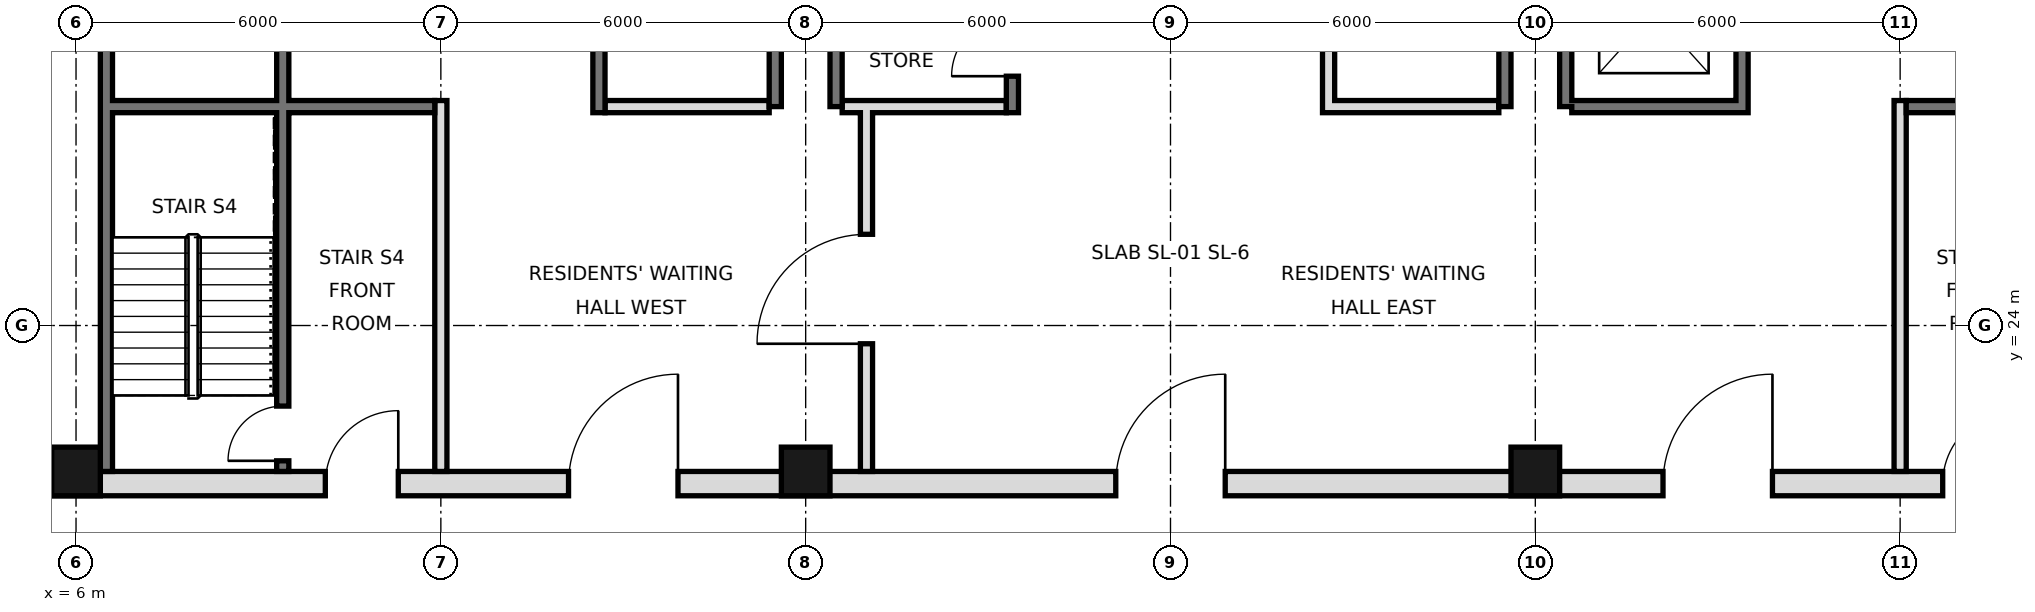
"""IFC4 building model, lengths in metres.
Left out: names, types, materials, properties, quantities, classifications, styles, units other than length and angle.
Written with IfcOpenShell. Run it as: python <this file> out.ifc"""

import sys

from ifc_helpers import new_model, si_unit, direction, frame, frame_2d, origin, origin_2d, place, context, subcontext, project, spatial, rectangle, hollow_rectangle, extrude, element, fill, save


model = new_model("IFC4")
c1 = context("Model", 3, precision=1e-05, world=origin(), true_north=direction((0.0, 1.0)))
c2 = subcontext(c1, "Body", "Model", "MODEL_VIEW")
j1 = project(units=[si_unit("LENGTHUNIT", "METRE"), si_unit("PLANEANGLEUNIT", "RADIAN")], contexts=[c1])
p1 = place(None, origin())
s1 = spatial("IfcSite", under=j1, at=p1, CompositionType="ELEMENT")
p2 = place(p1, origin())
s2 = spatial("IfcBuilding", under=s1, at=p2, CompositionType="ELEMENT")
p3 = place(p2, frame((0.0, 0.0, 290.8)))
s3 = spatial("IfcBuildingStorey", under=s2, at=p3, CompositionType="ELEMENT", Elevation=290.8)
for number, where, z_axis, x_axis in (
    (1, (6.0, 21.6, 0.0), (0.0, 0.0, 1.0), (1.0, 0.0, 0.0)),
    (2, (18.0, 21.6, 0.0), (0.0, 0.0, 1.0), (1.0, 0.0, 0.0)),
    (3, (30.0, 21.6, 0.0), (0.0, 0.0, 1.0), (1.0, 0.0, 0.0)),
):
    element("IfcColumn", number, at=place(p3, frame(where, z_axis=z_axis, x_axis=x_axis)), inside=s3, PredefinedType="COLUMN", context=c2, shape_type="SweptSolid", body=[
        extrude(hollow_rectangle(XDim=0.8, YDim=0.8, WallThickness=0.032, at=origin_2d()), origin(), (0.0, 0.0, 1.0), 3.6),
    ])
p4 = place(p3, frame((6.5, 21.6, 0.0), z_axis=(0.0, 0.0, 1.0), x_axis=(0.0, 1.0, 0.0)))
e4 = element("IfcWall", 4, at=p4, inside=s3, PredefinedType="SOLIDWALL", context=c2, shape_type="SweptSolid", body=[
    extrude(rectangle(XDim=23.5, YDim=0.2, at=frame_2d((11.75, 0.0))), origin(), (0.0, 0.0, 1.0), 3.42),
])
for number, where, z_axis, x_axis in (
    (5, (17.5, 27.6, 0.0), (0.0, 0.0, 1.0), (0.0, 1.0, 0.0)),
    (6, (18.5, 27.6, 0.0), (0.0, 0.0, 1.0), (0.0, 1.0, 0.0)),
    (7, (29.5, 27.6, 0.0), (0.0, 0.0, 1.0), (0.0, 1.0, 0.0)),
    (8, (30.5, 27.6, 0.0), (0.0, 0.0, 1.0), (0.0, 1.0, 0.0)),
):
    element("IfcWall", number, at=place(p3, frame(where, z_axis=z_axis, x_axis=x_axis)), inside=s3, PredefinedType="SOLIDWALL", context=c2, shape_type="SweptSolid", body=[
        extrude(rectangle(XDim=17.5, YDim=0.2, at=frame_2d((8.75, 0.0))), origin(), (0.0, 0.0, 1.0), 3.42),
    ])
p5 = place(p3, frame((5.6, 21.4, 0.0), z_axis=(0.0, 0.0, 1.0), x_axis=(1.0, 0.0, 0.0)))
e9 = element("IfcWall", 9, at=p5, inside=s3, PredefinedType="SOLIDWALL", context=c2, shape_type="SweptSolid", body=[
    extrude(rectangle(XDim=36.8, YDim=0.4, at=frame_2d((18.4, 0.0))), origin(), (0.0, 0.0, 1.0), 3.42),
])
p6 = place(p5, frame((8.5, 0.0, 0.0)))
e10 = element("IfcOpeningElement", 10, at=p6, cuts=e9, PredefinedType="OPENING", context=c2, shape_type="SweptSolid", body=[
    extrude(rectangle(XDim=1.8, YDim=2.1, at=frame_2d((0.9, 1.05))), frame((0.0, 0.21, 0.0), z_axis=(0.0, -1.0, 0.0), x_axis=(1.0, 0.0, 0.0)), (0.0, 0.0, 1.0), 0.42),
])
p7 = place(p5, frame((17.5, 0.0, 0.0)))
e11 = element("IfcOpeningElement", 11, at=p7, cuts=e9, PredefinedType="OPENING", context=c2, shape_type="SweptSolid", body=[
    extrude(rectangle(XDim=1.8, YDim=2.1, at=frame_2d((0.9, 1.05))), frame((0.0, 0.21, 0.0), z_axis=(0.0, -1.0, 0.0), x_axis=(1.0, 0.0, 0.0)), (0.0, 0.0, 1.0), 0.42),
])
p8 = place(p5, frame((26.5, 0.0, 0.0)))
e12 = element("IfcOpeningElement", 12, at=p8, cuts=e9, PredefinedType="OPENING", context=c2, shape_type="SweptSolid", body=[
    extrude(rectangle(XDim=1.8, YDim=2.1, at=frame_2d((0.9, 1.05))), frame((0.0, 0.21, 0.0), z_axis=(0.0, -1.0, 0.0), x_axis=(1.0, 0.0, 0.0)), (0.0, 0.0, 1.0), 0.42),
])
p9 = place(p5, frame((4.5, 0.0, 0.0)))
e13 = element("IfcOpeningElement", 13, at=p9, cuts=e9, PredefinedType="OPENING", context=c2, shape_type="SweptSolid", body=[
    extrude(rectangle(XDim=1.2, YDim=2.1, at=frame_2d((0.6, 1.05))), frame((0.0, 0.21, 0.0), z_axis=(0.0, -1.0, 0.0), x_axis=(1.0, 0.0, 0.0)), (0.0, 0.0, 1.0), 0.42),
])
p10 = place(p5, frame((31.1, 0.0, 0.0)))
e14 = element("IfcOpeningElement", 14, at=p10, cuts=e9, PredefinedType="OPENING", context=c2, shape_type="SweptSolid", body=[
    extrude(rectangle(XDim=1.2, YDim=2.1, at=frame_2d((0.6, 1.05))), frame((0.0, 0.21, 0.0), z_axis=(0.0, -1.0, 0.0), x_axis=(1.0, 0.0, 0.0)), (0.0, 0.0, 1.0), 0.42),
])
p11 = place(p3, frame((19.0, 21.6, 0.0), z_axis=(0.0, 0.0, 1.0), x_axis=(0.0, 1.0, 0.0)))
e15 = element("IfcWall", 15, at=p11, inside=s3, PredefinedType="PARTITIONING", context=c2, shape_type="SweptSolid", body=[
    extrude(rectangle(XDim=6.0, YDim=0.2, at=frame_2d((3.0, 0.0))), origin(), (0.0, 0.0, 1.0), 3.42),
])
p12 = place(p11, frame((2.1, 0.0, 0.0)))
e16 = element("IfcOpeningElement", 16, at=p12, cuts=e15, PredefinedType="OPENING", context=c2, shape_type="SweptSolid", body=[
    extrude(rectangle(XDim=1.8, YDim=2.1, at=frame_2d((0.9, 1.05))), frame((0.0, 0.11, 0.0), z_axis=(0.0, -1.0, 0.0), x_axis=(1.0, 0.0, 0.0)), (0.0, 0.0, 1.0), 0.22),
])
p13 = place(p3, frame((12.0, 21.6, 0.0), z_axis=(0.0, 0.0, 1.0), x_axis=(0.0, 1.0, 0.0)))
e17 = element("IfcWall", 17, at=p13, inside=s3, PredefinedType="PARTITIONING", context=c2, shape_type="SweptSolid", body=[
    extrude(rectangle(XDim=6.1, YDim=0.2, at=frame_2d((3.05, 0.0))), origin(), (0.0, 0.0, 1.0), 3.42),
])
p14 = place(p3, frame((14.6, 27.5, 0.0), z_axis=(0.0, 0.0, 1.0), x_axis=(0.0, 1.0, 0.0)))
e18 = element("IfcWall", 18, at=p14, inside=s3, PredefinedType="SOLIDWALL", context=c2, shape_type="SweptSolid", body=[
    extrude(rectangle(XDim=17.5, YDim=0.2, at=frame_2d((8.75, 0.0))), origin(), (0.0, 0.0, 1.0), 3.42),
])
p15 = place(p14, frame((15.4, 0.0, 0.0)))
e19 = element("IfcOpeningElement", 19, at=p15, cuts=e18, PredefinedType="OPENING", context=c2, shape_type="SweptSolid", body=[
    extrude(rectangle(XDim=1.1, YDim=2.1, at=frame_2d((0.55, 1.05))), frame((0.0, 0.11, 0.0), z_axis=(0.0, -1.0, 0.0), x_axis=(1.0, 0.0, 0.0)), (0.0, 0.0, 1.0), 0.22),
])
p16 = place(p14, frame((2.7, 0.0, 0.0)))
e20 = element("IfcOpeningElement", 20, at=p16, cuts=e18, PredefinedType="OPENING", context=c2, shape_type="SweptSolid", body=[
    extrude(rectangle(XDim=1.0, YDim=2.1, at=frame_2d((0.5, 1.05))), frame((0.0, 0.11, 0.0), z_axis=(0.0, -1.0, 0.0), x_axis=(1.0, 0.0, 0.0)), (0.0, 0.0, 1.0), 0.22),
])
p17 = place(p14, frame((9.9, 0.0, 0.0)))
e21 = element("IfcOpeningElement", 21, at=p17, cuts=e18, PredefinedType="OPENING", context=c2, shape_type="SweptSolid", body=[
    extrude(rectangle(XDim=0.9, YDim=2.1, at=frame_2d((0.45, 1.05))), frame((0.0, 0.11, 0.0), z_axis=(0.0, -1.0, 0.0), x_axis=(1.0, 0.0, 0.0)), (0.0, 0.0, 1.0), 0.22),
])
p18 = place(p3, frame((21.4, 27.5, 0.0), z_axis=(0.0, 0.0, 1.0), x_axis=(0.0, 1.0, 0.0)))
e22 = element("IfcWall", 22, at=p18, inside=s3, PredefinedType="SOLIDWALL", context=c2, shape_type="SweptSolid", body=[
    extrude(rectangle(XDim=17.5, YDim=0.2, at=frame_2d((8.75, 0.0))), origin(), (0.0, 0.0, 1.0), 3.42),
])
p19 = place(p18, frame((0.6, 0.0, 0.0)))
e23 = element("IfcOpeningElement", 23, at=p19, cuts=e22, PredefinedType="OPENING", context=c2, shape_type="SweptSolid", body=[
    extrude(rectangle(XDim=1.0, YDim=2.1, at=frame_2d((0.5, 1.05))), frame((0.0, 0.11, 0.0), z_axis=(0.0, -1.0, 0.0), x_axis=(1.0, 0.0, 0.0)), (0.0, 0.0, 1.0), 0.22),
])
p20 = place(p18, frame((3.7, 0.0, 0.0)))
e24 = element("IfcOpeningElement", 24, at=p20, cuts=e22, PredefinedType="OPENING", context=c2, shape_type="SweptSolid", body=[
    extrude(rectangle(XDim=1.0, YDim=2.1, at=frame_2d((0.5, 1.05))), frame((0.0, 0.11, 0.0), z_axis=(0.0, -1.0, 0.0), x_axis=(1.0, 0.0, 0.0)), (0.0, 0.0, 1.0), 0.22),
])
p21 = place(p18, frame((16.2, 0.0, 0.0)))
e25 = element("IfcOpeningElement", 25, at=p21, cuts=e22, PredefinedType="OPENING", context=c2, shape_type="SweptSolid", body=[
    extrude(rectangle(XDim=1.0, YDim=2.1, at=frame_2d((0.5, 1.05))), frame((0.0, 0.11, 0.0), z_axis=(0.0, -1.0, 0.0), x_axis=(1.0, 0.0, 0.0)), (0.0, 0.0, 1.0), 0.22),
])
p22 = place(p18, frame((7.4, 0.0, 0.0)))
e26 = element("IfcOpeningElement", 26, at=p22, cuts=e22, PredefinedType="OPENING", context=c2, shape_type="SweptSolid", body=[
    extrude(rectangle(XDim=0.9, YDim=2.1, at=frame_2d((0.45, 1.05))), frame((0.0, 0.11, 0.0), z_axis=(0.0, -1.0, 0.0), x_axis=(1.0, 0.0, 0.0)), (0.0, 0.0, 1.0), 0.22),
])
p23 = place(p3, frame((26.6, 27.5, 0.0), z_axis=(0.0, 0.0, 1.0), x_axis=(0.0, 1.0, 0.0)))
e27 = element("IfcWall", 27, at=p23, inside=s3, PredefinedType="SOLIDWALL", context=c2, shape_type="SweptSolid", body=[
    extrude(rectangle(XDim=17.5, YDim=0.2, at=frame_2d((8.75, 0.0))), origin(), (0.0, 0.0, 1.0), 3.42),
])
p24 = place(p23, frame((4.3, 0.0, 0.0)))
e28 = element("IfcOpeningElement", 28, at=p24, cuts=e27, PredefinedType="OPENING", context=c2, shape_type="SweptSolid", body=[
    extrude(rectangle(XDim=0.9, YDim=2.1, at=frame_2d((0.45, 1.05))), frame((0.0, 0.11, 0.0), z_axis=(0.0, -1.0, 0.0), x_axis=(1.0, 0.0, 0.0)), (0.0, 0.0, 1.0), 0.22),
])
p25 = place(p23, frame((10.35, 0.0, 0.0)))
e29 = element("IfcOpeningElement", 29, at=p25, cuts=e27, PredefinedType="OPENING", context=c2, shape_type="SweptSolid", body=[
    extrude(rectangle(XDim=1.0, YDim=2.1, at=frame_2d((0.5, 1.05))), frame((0.0, 0.11, 0.0), z_axis=(0.0, -1.0, 0.0), x_axis=(1.0, 0.0, 0.0)), (0.0, 0.0, 1.0), 0.22),
])
p26 = place(p3, frame((33.4, 27.5, 0.0), z_axis=(0.0, 0.0, 1.0), x_axis=(0.0, 1.0, 0.0)))
e30 = element("IfcWall", 30, at=p26, inside=s3, PredefinedType="SOLIDWALL", context=c2, shape_type="SweptSolid", body=[
    extrude(rectangle(XDim=17.5, YDim=0.2, at=frame_2d((8.75, 0.0))), origin(), (0.0, 0.0, 1.0), 3.42),
])
p27 = place(p26, frame((1.1, 0.0, 0.0)))
e31 = element("IfcOpeningElement", 31, at=p27, cuts=e30, PredefinedType="OPENING", context=c2, shape_type="SweptSolid", body=[
    extrude(rectangle(XDim=1.1, YDim=2.1, at=frame_2d((0.55, 1.05))), frame((0.0, 0.11, 0.0), z_axis=(0.0, -1.0, 0.0), x_axis=(1.0, 0.0, 0.0)), (0.0, 0.0, 1.0), 0.22),
])
p28 = place(p26, frame((4.2, 0.0, 0.0)))
e32 = element("IfcOpeningElement", 32, at=p28, cuts=e30, PredefinedType="OPENING", context=c2, shape_type="SweptSolid", body=[
    extrude(rectangle(XDim=1.1, YDim=2.1, at=frame_2d((0.55, 1.05))), frame((0.0, 0.11, 0.0), z_axis=(0.0, -1.0, 0.0), x_axis=(1.0, 0.0, 0.0)), (0.0, 0.0, 1.0), 0.22),
])
p29 = place(p26, frame((15.4, 0.0, 0.0)))
e33 = element("IfcOpeningElement", 33, at=p29, cuts=e30, PredefinedType="OPENING", context=c2, shape_type="SweptSolid", body=[
    extrude(rectangle(XDim=1.1, YDim=2.1, at=frame_2d((0.55, 1.05))), frame((0.0, 0.11, 0.0), z_axis=(0.0, -1.0, 0.0), x_axis=(1.0, 0.0, 0.0)), (0.0, 0.0, 1.0), 0.22),
])
p30 = place(p26, frame((9.9, 0.0, 0.0)))
e34 = element("IfcOpeningElement", 34, at=p30, cuts=e30, PredefinedType="OPENING", context=c2, shape_type="SweptSolid", body=[
    extrude(rectangle(XDim=0.9, YDim=2.1, at=frame_2d((0.45, 1.05))), frame((0.0, 0.11, 0.0), z_axis=(0.0, -1.0, 0.0), x_axis=(1.0, 0.0, 0.0)), (0.0, 0.0, 1.0), 0.22),
])
p31 = place(p3, frame((36.0, 21.6, 0.0), z_axis=(0.0, 0.0, 1.0), x_axis=(0.0, 1.0, 0.0)))
e35 = element("IfcWall", 35, at=p31, inside=s3, PredefinedType="PARTITIONING", context=c2, shape_type="SweptSolid", body=[
    extrude(rectangle(XDim=6.1, YDim=0.2, at=frame_2d((3.05, 0.0))), origin(), (0.0, 0.0, 1.0), 3.42),
])
p32 = place(p3, frame((9.4, 21.6, 0.0), z_axis=(0.0, 0.0, 1.0), x_axis=(0.0, 1.0, 0.0)))
e36 = element("IfcWall", 36, at=p32, inside=s3, PredefinedType="SOLIDWALL", context=c2, shape_type="SweptSolid", body=[
    extrude(rectangle(XDim=23.4, YDim=0.2, at=frame_2d((11.7, 0.0))), origin(), (0.0, 0.0, 1.0), 3.42),
])
p33 = place(p32, frame((7.95, 0.0, 0.0)))
e37 = element("IfcOpeningElement", 37, at=p33, cuts=e36, PredefinedType="OPENING", context=c2, shape_type="SweptSolid", body=[
    extrude(rectangle(XDim=1.0, YDim=2.1, at=frame_2d((0.5, 1.05))), frame((0.0, 0.11, 0.0), z_axis=(0.0, -1.0, 0.0), x_axis=(1.0, 0.0, 0.0)), (0.0, 0.0, 1.0), 0.22),
])
p34 = place(p32, frame((12.6, 0.0, 0.0)))
e38 = element("IfcOpeningElement", 38, at=p34, cuts=e36, PredefinedType="OPENING", context=c2, shape_type="SweptSolid", body=[
    extrude(rectangle(XDim=1.0, YDim=2.1, at=frame_2d((0.5, 1.05))), frame((0.0, 0.11, 0.0), z_axis=(0.0, -1.0, 0.0), x_axis=(1.0, 0.0, 0.0)), (0.0, 0.0, 1.0), 0.22),
])
p35 = place(p32, frame((22.1, 0.0, 0.0)))
e39 = element("IfcOpeningElement", 39, at=p35, cuts=e36, PredefinedType="OPENING", context=c2, shape_type="SweptSolid", body=[
    extrude(rectangle(XDim=1.0, YDim=2.1, at=frame_2d((0.5, 1.05))), frame((0.0, 0.11, 0.0), z_axis=(0.0, -1.0, 0.0), x_axis=(1.0, 0.0, 0.0)), (0.0, 0.0, 1.0), 0.22),
])
p36 = place(p32, frame((0.175, 0.0, 0.0)))
e40 = element("IfcOpeningElement", 40, at=p36, cuts=e36, PredefinedType="OPENING", context=c2, shape_type="SweptSolid", body=[
    extrude(rectangle(XDim=0.9, YDim=2.1, at=frame_2d((0.45, 1.05))), frame((0.0, 0.11, 0.0), z_axis=(0.0, -1.0, 0.0), x_axis=(1.0, 0.0, 0.0)), (0.0, 0.0, 1.0), 0.22),
])
for number, where, z_axis, x_axis in (
    (41, (14.7, 27.6, 0.0), (0.0, 0.0, 1.0), (1.0, 0.0, 0.0)),
    (42, (18.6, 27.6, 0.0), (0.0, 0.0, 1.0), (1.0, 0.0, 0.0)),
):
    element("IfcWall", number, at=place(p3, frame(where, z_axis=z_axis, x_axis=x_axis)), inside=s3, PredefinedType="PARTITIONING", context=c2, shape_type="SweptSolid", body=[
        extrude(rectangle(XDim=2.7, YDim=0.2, at=frame_2d((1.35, 0.0))), origin(), (0.0, 0.0, 1.0), 3.42),
    ])
for number, where, z_axis, x_axis in (
    (43, (26.7, 27.6, 0.0), (0.0, 0.0, 1.0), (1.0, 0.0, 0.0)),
    (44, (30.6, 27.6, 0.0), (0.0, 0.0, 1.0), (1.0, 0.0, 0.0)),
):
    element("IfcWall", number, at=place(p3, frame(where, z_axis=z_axis, x_axis=x_axis)), inside=s3, PredefinedType="SOLIDWALL", context=c2, shape_type="SweptSolid", body=[
        extrude(rectangle(XDim=2.7, YDim=0.2, at=frame_2d((1.35, 0.0))), origin(), (0.0, 0.0, 1.0), 3.42),
    ])
for number, where, z_axis, x_axis in (
    (45, (36.1, 27.6, 0.0), (0.0, 0.0, 1.0), (1.0, 0.0, 0.0)),
    (46, (6.6, 27.6, 0.0), (0.0, 0.0, 1.0), (1.0, 0.0, 0.0)),
):
    element("IfcWall", number, at=place(p3, frame(where, z_axis=z_axis, x_axis=x_axis)), inside=s3, PredefinedType="SOLIDWALL", context=c2, shape_type="SweptSolid", body=[
        extrude(rectangle(XDim=5.3, YDim=0.2, at=frame_2d((2.65, 0.0))), origin(), (0.0, 0.0, 1.0), 3.42),
    ])
p37 = place(p6, frame((1.8, 0.0, 0.0), z_axis=(0.0, 0.0, 1.0), x_axis=(-1.0, 0.0, 0.0)))
e47 = element("IfcDoor", 47, at=p37, inside=s3, OperationType="SINGLE_SWING_LEFT", PredefinedType="DOOR", context=c2, shape_type="SweptSolid", body=[
    extrude(rectangle(XDim=1.8, YDim=2.1, at=frame_2d((0.9, 1.05))), frame((0.0, 0.025, 0.0), z_axis=(0.0, -1.0, 0.0), x_axis=(1.0, 0.0, 0.0)), (0.0, 0.0, 1.0), 0.05),
])
fill(e10, e47)
p38 = place(p12, origin())
e48 = element("IfcDoor", 48, at=p38, inside=s3, OperationType="SINGLE_SWING_LEFT", PredefinedType="DOOR", context=c2, shape_type="SweptSolid", body=[
    extrude(rectangle(XDim=1.8, YDim=2.1, at=frame_2d((0.9, 1.05))), frame((0.0, 0.025, 0.0), z_axis=(0.0, -1.0, 0.0), x_axis=(1.0, 0.0, 0.0)), (0.0, 0.0, 1.0), 0.05),
])
fill(e16, e48)
p39 = place(p7, frame((1.8, 0.0, 0.0), z_axis=(0.0, 0.0, 1.0), x_axis=(-1.0, 0.0, 0.0)))
e49 = element("IfcDoor", 49, at=p39, inside=s3, OperationType="SINGLE_SWING_LEFT", PredefinedType="DOOR", context=c2, shape_type="SweptSolid", body=[
    extrude(rectangle(XDim=1.8, YDim=2.1, at=frame_2d((0.9, 1.05))), frame((0.0, 0.025, 0.0), z_axis=(0.0, -1.0, 0.0), x_axis=(1.0, 0.0, 0.0)), (0.0, 0.0, 1.0), 0.05),
])
fill(e11, e49)
p40 = place(p8, frame((1.8, 0.0, 0.0), z_axis=(0.0, 0.0, 1.0), x_axis=(-1.0, 0.0, 0.0)))
e50 = element("IfcDoor", 50, at=p40, inside=s3, OperationType="SINGLE_SWING_LEFT", PredefinedType="DOOR", context=c2, shape_type="SweptSolid", body=[
    extrude(rectangle(XDim=1.8, YDim=2.1, at=frame_2d((0.9, 1.05))), frame((0.0, 0.025, 0.0), z_axis=(0.0, -1.0, 0.0), x_axis=(1.0, 0.0, 0.0)), (0.0, 0.0, 1.0), 0.05),
])
fill(e12, e50)
p41 = place(p9, frame((1.2, 0.0, 0.0), z_axis=(0.0, 0.0, 1.0), x_axis=(-1.0, 0.0, 0.0)))
e51 = element("IfcDoor", 51, at=p41, inside=s3, OperationType="SINGLE_SWING_LEFT", PredefinedType="DOOR", context=c2, shape_type="SweptSolid", body=[
    extrude(rectangle(XDim=1.2, YDim=2.1, at=frame_2d((0.6, 1.05))), frame((0.0, 0.025, 0.0), z_axis=(0.0, -1.0, 0.0), x_axis=(1.0, 0.0, 0.0)), (0.0, 0.0, 1.0), 0.05),
])
fill(e13, e51)
p42 = place(p10, frame((1.2, 0.0, 0.0), z_axis=(0.0, 0.0, 1.0), x_axis=(-1.0, 0.0, 0.0)))
e52 = element("IfcDoor", 52, at=p42, inside=s3, OperationType="SINGLE_SWING_LEFT", PredefinedType="DOOR", context=c2, shape_type="SweptSolid", body=[
    extrude(rectangle(XDim=1.2, YDim=2.1, at=frame_2d((0.6, 1.05))), frame((0.0, 0.025, 0.0), z_axis=(0.0, -1.0, 0.0), x_axis=(1.0, 0.0, 0.0)), (0.0, 0.0, 1.0), 0.05),
])
fill(e14, e52)
p43 = place(p19, origin())
e53 = element("IfcDoor", 53, at=p43, inside=s3, OperationType="SINGLE_SWING_LEFT", PredefinedType="DOOR", context=c2, shape_type="SweptSolid", body=[
    extrude(rectangle(XDim=1.0, YDim=2.1, at=frame_2d((0.5, 1.05))), frame((0.0, 0.025, 0.0), z_axis=(0.0, -1.0, 0.0), x_axis=(1.0, 0.0, 0.0)), (0.0, 0.0, 1.0), 0.05),
])
fill(e23, e53)
p44 = place(p36, origin())
e54 = element("IfcDoor", 54, at=p44, inside=s3, OperationType="SINGLE_SWING_LEFT", PredefinedType="DOOR", context=c2, shape_type="SweptSolid", body=[
    extrude(rectangle(XDim=0.9, YDim=2.1, at=frame_2d((0.45, 1.05))), frame((0.0, 0.025, 0.0), z_axis=(0.0, -1.0, 0.0), x_axis=(1.0, 0.0, 0.0)), (0.0, 0.0, 1.0), 0.05),
])
fill(e40, e54)
save(model, sys.argv[1])
